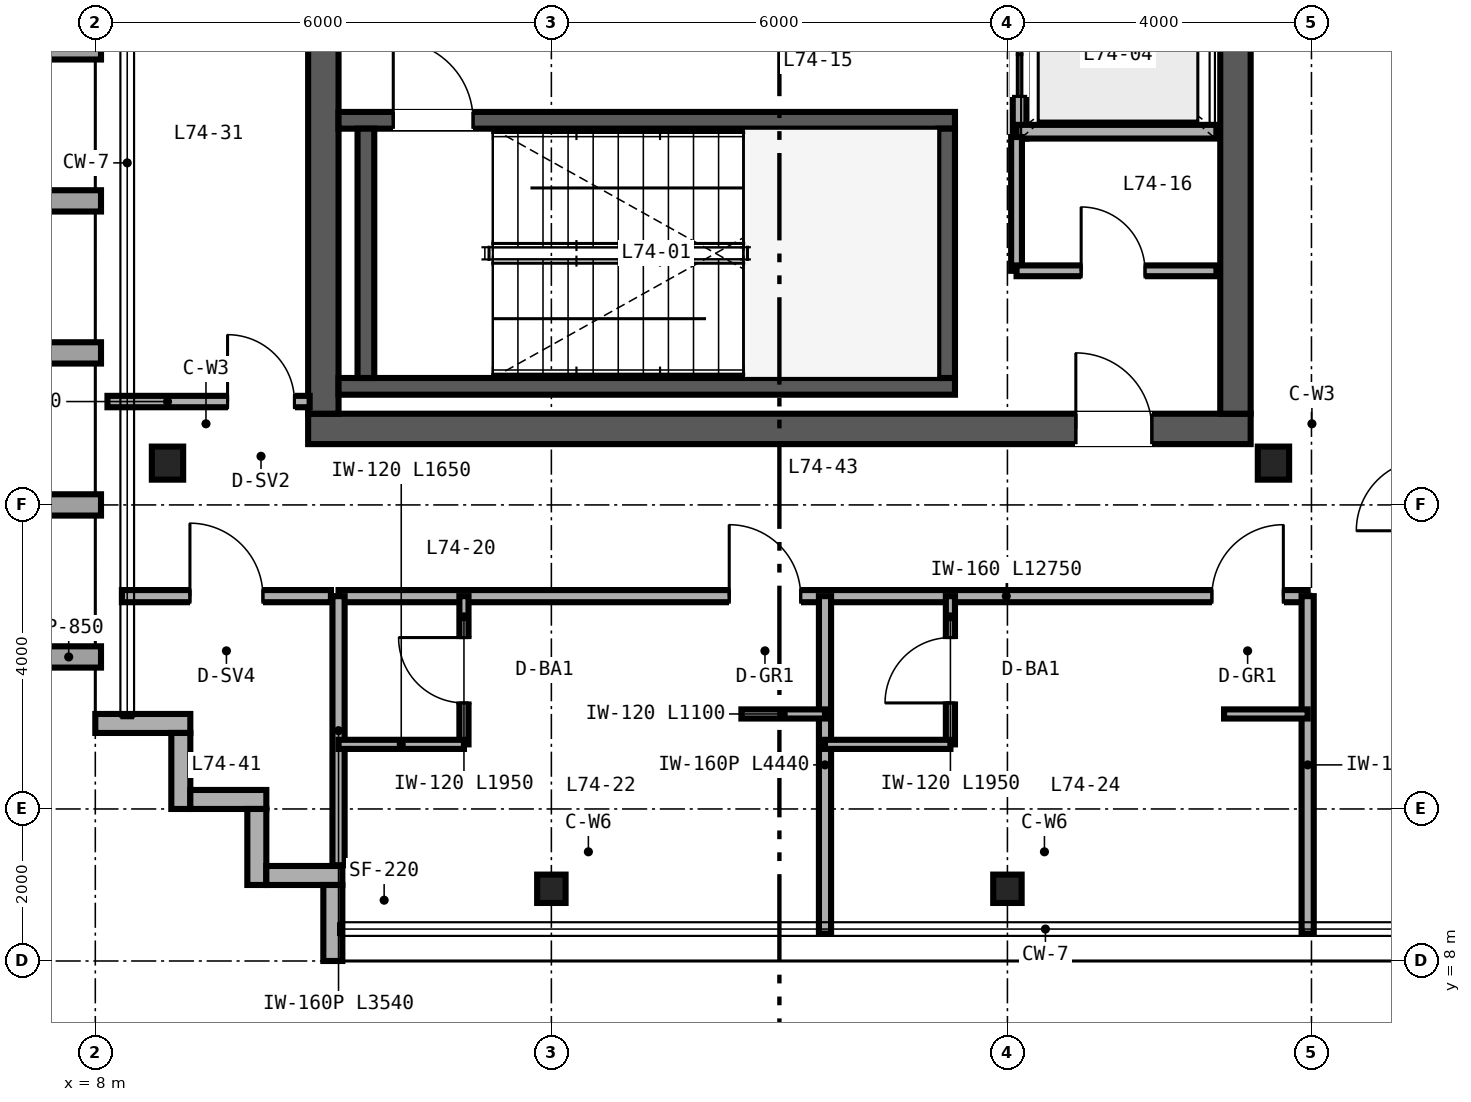
"""IFC4 building model, lengths in metres.
Left out: names, types, materials, properties, quantities, classifications, styles, units other than length and angle.
Written with IfcOpenShell. Run it as: python <this file> out.ifc"""

import sys

from ifc_helpers import new_model, si_unit, direction, frame, frame_2d, origin, origin_2d, place, context, subcontext, project, spatial, rectangle, i_section, extrude, source, transform, mapped, element, fill, save


model = new_model("IFC4")
c1 = context("Model", 3, precision=1e-05, world=origin(), true_north=direction((0.0, 1.0)))
c2 = subcontext(c1, "Body", "Model", "MODEL_VIEW")
j1 = project(units=[si_unit("LENGTHUNIT", "METRE"), si_unit("PLANEANGLEUNIT", "RADIAN")], contexts=[c1])
p1 = place(None, origin())
s1 = spatial("IfcSite", under=j1, at=p1, CompositionType="ELEMENT")
p2 = place(p1, origin())
s2 = spatial("IfcBuilding", under=s1, at=p2, CompositionType="ELEMENT")
p3 = place(p2, frame((0.0, 0.0, 290.4)))
s3 = spatial("IfcBuildingStorey", under=s2, at=p3, CompositionType="ELEMENT", Elevation=290.4)
p4 = place(p3, frame((10.8, 15.0, 0.0), z_axis=(0.0, 0.0, 1.0), x_axis=(1.0, 0.0, 0.0)))
e1 = element("IfcWall", 1, at=p4, inside=s3, PredefinedType="SHEAR", context=c2, shape_type="SweptSolid", body=[
    extrude(rectangle(XDim=12.4, YDim=0.4, at=frame_2d((6.2, 0.0))), origin(), (0.0, 0.0, 1.0), 3.38),
])
p5 = place(p4, frame((10.1, 0.0, 0.0)))
e2 = element("IfcOpeningElement", 2, at=p5, cuts=e1, PredefinedType="OPENING", context=c2, shape_type="SweptSolid", body=[
    extrude(rectangle(XDim=1.0, YDim=2.15, at=frame_2d((0.5, 1.075))), frame((0.0, 0.21, 0.0), z_axis=(0.0, -1.0, 0.0), x_axis=(1.0, 0.0, 0.0)), (0.0, 0.0, 1.0), 0.42),
])
for number, where, z_axis, x_axis in (
    (3, (11.0, 15.2, 0.0), (0.0, 0.0, 1.0), (0.0, 1.0, 0.0)),
    (4, (23.0, 15.2, 0.0), (0.0, 0.0, 1.0), (0.0, 1.0, 0.0)),
):
    element("IfcWall", number, at=place(p3, frame(where, z_axis=z_axis, x_axis=x_axis)), inside=s3, PredefinedType="SHEAR", context=c2, shape_type="SweptSolid", body=[
        extrude(rectangle(XDim=21.6, YDim=0.4, at=frame_2d((10.8, 0.0))), origin(), (0.0, 0.0, 1.0), 3.38),
    ])
p6 = place(p3, frame((11.2, 15.56, 0.0), z_axis=(0.0, 0.0, 1.0), x_axis=(1.0, 0.0, 0.0)))
e5 = element("IfcWall", 5, at=p6, inside=s3, PredefinedType="SHEAR", context=c2, shape_type="SweptSolid", body=[
    extrude(rectangle(XDim=8.11, YDim=0.22, at=frame_2d((4.055, 0.0))), origin(), (0.0, 0.0, 1.0), 3.4),
])
p7 = place(p3, frame((11.2, 19.06, 0.0), z_axis=(0.0, 0.0, 1.0), x_axis=(1.0, 0.0, 0.0)))
e6 = element("IfcWall", 6, at=p7, inside=s3, PredefinedType="SHEAR", context=c2, shape_type="SweptSolid", body=[
    extrude(rectangle(XDim=8.11, YDim=0.22, at=frame_2d((4.055, 0.0))), origin(), (0.0, 0.0, 1.0), 3.4),
])
p8 = place(p7, frame((0.72, 0.0, 0.0)))
e7 = element("IfcOpeningElement", 7, at=p8, cuts=e6, PredefinedType="OPENING", context=c2, shape_type="SweptSolid", body=[
    extrude(rectangle(XDim=1.05, YDim=2.15, at=frame_2d((0.525, 1.075))), frame((0.0, 0.12, 0.0), z_axis=(0.0, -1.0, 0.0), x_axis=(1.0, 0.0, 0.0)), (0.0, 0.0, 1.0), 0.24),
])
for number, where, z_axis, x_axis in (
    (8, (11.56, 15.67, 0.0), (0.0, 0.0, 1.0), (0.0, 1.0, 0.0)),
    (9, (19.2, 15.67, 0.0), (0.0, 0.0, 1.0), (0.0, 1.0, 0.0)),
):
    element("IfcWall", number, at=place(p3, frame(where, z_axis=z_axis, x_axis=x_axis)), inside=s3, PredefinedType="SHEAR", context=c2, shape_type="SweptSolid", body=[
        extrude(rectangle(XDim=3.28, YDim=0.22, at=frame_2d((1.64, 0.0))), origin(), (0.0, 0.0, 1.0), 3.4),
    ])
m1 = source(origin(), c2, "Body", "SweptSolid", [
    extrude(i_section(OverallWidth=0.412, OverallDepth=0.435, WebThickness=0.036, FlangeThickness=0.057, FilletRadius=0.025, at=origin_2d()), origin(), (0.0, 0.0, 1.0), 3.38),
])
for number, where, z_axis, x_axis in (
    (10, (8.95, 14.55, 0.0), (0.0, 0.0, 1.0), (1.0, 0.0, 0.0)),
    (11, (23.5, 14.55, 0.0), (0.0, 0.0, 1.0), (1.0, 0.0, 0.0)),
):
    element("IfcColumn", number, at=place(p3, frame(where, z_axis=z_axis, x_axis=x_axis)), inside=s3, PredefinedType="COLUMN", context=c2, shape_type="MappedRepresentation", body=[
        mapped(m1, transform((0.0, 0.0, 0.0), scale=1.0)),
    ])
m2 = source(origin(), c2, "Body", "SweptSolid", [
    extrude(i_section(OverallWidth=0.374, OverallDepth=0.373, WebThickness=0.016, FlangeThickness=0.026, FilletRadius=0.025, at=origin_2d()), origin(), (0.0, 0.0, 1.0), 3.38),
])
for number, where, z_axis, x_axis in (
    (12, (14.0, 8.95, 0.0), (0.0, 0.0, 1.0), (1.0, 0.0, 0.0)),
    (13, (20.0, 8.95, 0.0), (0.0, 0.0, 1.0), (1.0, 0.0, 0.0)),
):
    element("IfcColumn", number, at=place(p3, frame(where, z_axis=z_axis, x_axis=x_axis)), inside=s3, PredefinedType="COLUMN", context=c2, shape_type="MappedRepresentation", body=[
        mapped(m2, transform((0.0, 0.0, 0.0), scale=1.0)),
    ])
p9 = place(p3, frame((8.0, 11.125, 0.0), z_axis=(0.0, 0.0, 1.0), x_axis=(1.0, 0.0, 0.0)))
e14 = element("IfcWall", 14, at=p9, inside=s3, PredefinedType="SOLIDWALL", context=c2, shape_type="SweptSolid", body=[
    extrude(rectangle(XDim=1.25, YDim=0.25, at=frame_2d((0.625, 0.0))), origin(), (0.0, 0.0, 1.0), 3.38),
])
for number, where, z_axis, x_axis in (
    (15, (9.125, 11.0, 0.0), (0.0, 0.0, 1.0), (0.0, -1.0, 0.0)),
    (16, (9.25, 10.125, 0.0), (0.0, 0.0, 1.0), (1.0, 0.0, 0.0)),
    (17, (10.125, 10.0, 0.0), (0.0, 0.0, 1.0), (0.0, -1.0, 0.0)),
    (18, (10.25, 9.125, 0.0), (0.0, 0.0, 1.0), (1.0, 0.0, 0.0)),
    (19, (11.125, 9.0, 0.0), (0.0, 0.0, 1.0), (0.0, -1.0, 0.0)),
):
    element("IfcWall", number, at=place(p3, frame(where, z_axis=z_axis, x_axis=x_axis)), inside=s3, PredefinedType="SOLIDWALL", context=c2, shape_type="SweptSolid", body=[
        extrude(rectangle(XDim=1.0, YDim=0.25, at=frame_2d((0.5, 0.0))), origin(), (0.0, 0.0, 1.0), 3.38),
    ])
p10 = place(p3, frame((20.16, 18.82, 0.0), z_axis=(0.0, 0.0, 1.0), x_axis=(0.0, 1.0, 0.0)))
e20 = element("IfcWall", 20, at=p10, inside=s3, PredefinedType="SOLIDWALL", context=c2, shape_type="SweptSolid", body=[
    extrude(rectangle(XDim=6.32, YDim=0.18, at=frame_2d((3.16, 0.0))), origin(), (0.0, 0.0, 1.0), 2.48),
])
p11 = place(p10, frame((0.555, 0.0, 0.0)))
e21 = element("IfcOpeningElement", 21, at=p11, cuts=e20, PredefinedType="OPENING", context=c2, shape_type="SweptSolid", body=[
    extrude(rectangle(XDim=1.1, YDim=2.2, at=frame_2d((0.55, 1.1))), frame((0.0, 0.1, 0.0), z_axis=(0.0, -1.0, 0.0), x_axis=(1.0, 0.0, 0.0)), (0.0, 0.0, 1.0), 0.2),
])
p12 = place(p10, frame((2.635, 0.0, 0.0)))
e22 = element("IfcOpeningElement", 22, at=p12, cuts=e20, PredefinedType="OPENING", context=c2, shape_type="SweptSolid", body=[
    extrude(rectangle(XDim=1.1, YDim=2.2, at=frame_2d((0.55, 1.1))), frame((0.0, 0.1, 0.0), z_axis=(0.0, -1.0, 0.0), x_axis=(1.0, 0.0, 0.0)), (0.0, 0.0, 1.0), 0.2),
])
p13 = place(p10, frame((4.69, 0.0, 0.0)))
e23 = element("IfcOpeningElement", 23, at=p13, cuts=e20, PredefinedType="OPENING", context=c2, shape_type="SweptSolid", body=[
    extrude(rectangle(XDim=1.1, YDim=2.2, at=frame_2d((0.55, 1.1))), frame((0.0, 0.1, 0.0), z_axis=(0.0, -1.0, 0.0), x_axis=(1.0, 0.0, 0.0)), (0.0, 0.0, 1.0), 0.2),
])
p14 = place(p3, frame((20.12, 18.91, 0.0), z_axis=(0.0, 0.0, 1.0), x_axis=(1.0, 0.0, 0.0)))
e24 = element("IfcWall", 24, at=p14, inside=s3, PredefinedType="SOLIDWALL", context=c2, shape_type="SweptSolid", body=[
    extrude(rectangle(XDim=2.63, YDim=0.18, at=frame_2d((1.315, 0.0))), origin(), (0.0, 0.0, 1.0), 3.38),
])
p15 = place(p3, frame((20.12, 17.08, 0.0), z_axis=(0.0, 0.0, 1.0), x_axis=(0.0, 1.0, 0.0)))
e25 = element("IfcWall", 25, at=p15, inside=s3, PredefinedType="PARTITIONING", context=c2, shape_type="SweptSolid", body=[
    extrude(rectangle(XDim=1.76, YDim=0.142, at=frame_2d((0.88, 0.0))), origin(), (0.0, 0.0, 1.0), 3.38),
])
p16 = place(p3, frame((20.12, 17.08, 0.0), z_axis=(0.0, 0.0, 1.0), x_axis=(1.0, 0.0, 0.0)))
e26 = element("IfcWall", 26, at=p16, inside=s3, PredefinedType="PARTITIONING", context=c2, shape_type="SweptSolid", body=[
    extrude(rectangle(XDim=2.63, YDim=0.142, at=frame_2d((1.315, 0.0))), origin(), (0.0, 0.0, 1.0), 3.38),
])
p17 = place(p16, frame((0.85, 0.0, 0.0)))
e27 = element("IfcOpeningElement", 27, at=p17, cuts=e26, PredefinedType="OPENING", context=c2, shape_type="SweptSolid", body=[
    extrude(rectangle(XDim=0.84, YDim=2.1, at=frame_2d((0.42, 1.05))), frame((0.0, 0.081, 0.0), z_axis=(0.0, -1.0, 0.0), x_axis=(1.0, 0.0, 0.0)), (0.0, 0.0, 1.0), 0.162),
])
p18 = place(p3, frame((11.2, 12.8, 0.0), z_axis=(0.0, 0.0, 1.0), x_axis=(1.0, 0.0, 0.0)))
e28 = element("IfcWall", 28, at=p18, inside=s3, PredefinedType="PARTITIONING", context=c2, shape_type="SweptSolid", body=[
    extrude(rectangle(XDim=12.75, YDim=0.16, at=frame_2d((6.375, 0.0))), origin(), (0.0, 0.0, 1.0), 3.38),
])
p19 = place(p18, frame((5.14, 0.0, 0.0)))
e29 = element("IfcOpeningElement", 29, at=p19, cuts=e28, PredefinedType="OPENING", context=c2, shape_type="SweptSolid", body=[
    extrude(rectangle(XDim=0.94, YDim=2.15, at=frame_2d((0.47, 1.075))), frame((0.0, 0.09, 0.0), z_axis=(0.0, -1.0, 0.0), x_axis=(1.0, 0.0, 0.0)), (0.0, 0.0, 1.0), 0.18),
])
p20 = place(p18, frame((11.49, 0.0, 0.0)))
e30 = element("IfcOpeningElement", 30, at=p20, cuts=e28, PredefinedType="OPENING", context=c2, shape_type="SweptSolid", body=[
    extrude(rectangle(XDim=0.94, YDim=2.15, at=frame_2d((0.47, 1.075))), frame((0.0, 0.09, 0.0), z_axis=(0.0, -1.0, 0.0), x_axis=(1.0, 0.0, 0.0)), (0.0, 0.0, 1.0), 0.18),
])
p21 = place(p3, frame((11.2, 9.26, 0.0), z_axis=(0.0, 0.0, 1.0), x_axis=(0.0, 1.0, 0.0)))
e31 = element("IfcWall", 31, at=p21, inside=s3, PredefinedType="PARTITIONING", context=c2, shape_type="SweptSolid", body=[
    extrude(rectangle(XDim=3.54, YDim=0.16, at=frame_2d((1.77, 0.0))), origin(), (0.0, 0.0, 1.0), 3.38),
])
p22 = place(p3, frame((23.95, 8.36, 0.0), z_axis=(0.0, 0.0, 1.0), x_axis=(0.0, 1.0, 0.0)))
e32 = element("IfcWall", 32, at=p22, inside=s3, PredefinedType="PARTITIONING", context=c2, shape_type="SweptSolid", body=[
    extrude(rectangle(XDim=4.44, YDim=0.16, at=frame_2d((2.22, 0.0))), origin(), (0.0, 0.0, 1.0), 3.38),
])
p23 = place(p3, frame((17.6, 8.36, 0.0), z_axis=(0.0, 0.0, 1.0), x_axis=(0.0, 1.0, 0.0)))
e33 = element("IfcWall", 33, at=p23, inside=s3, PredefinedType="PARTITIONING", context=c2, shape_type="SweptSolid", body=[
    extrude(rectangle(XDim=4.44, YDim=0.16, at=frame_2d((2.22, 0.0))), origin(), (0.0, 0.0, 1.0), 2.687),
])
p24 = place(p3, frame((12.85, 10.85, 0.0), z_axis=(0.0, 0.0, 1.0), x_axis=(0.0, 1.0, 0.0)))
e34 = element("IfcWall", 34, at=p24, inside=s3, PredefinedType="PARTITIONING", context=c2, shape_type="SweptSolid", body=[
    extrude(rectangle(XDim=1.95, YDim=0.12, at=frame_2d((0.975, 0.0))), origin(), (0.0, 0.0, 1.0), 3.38),
])
p25 = place(p24, frame((0.545, 0.0, 0.0)))
e35 = element("IfcOpeningElement", 35, at=p25, cuts=e34, PredefinedType="OPENING", context=c2, shape_type="SweptSolid", body=[
    extrude(rectangle(XDim=0.86, YDim=2.1, at=frame_2d((0.43, 1.05))), frame((0.0, 0.07, 0.0), z_axis=(0.0, -1.0, 0.0), x_axis=(1.0, 0.0, 0.0)), (0.0, 0.0, 1.0), 0.14),
])
p26 = place(p3, frame((11.2, 10.85, 0.0), z_axis=(0.0, 0.0, 1.0), x_axis=(1.0, 0.0, 0.0)))
e36 = element("IfcWall", 36, at=p26, inside=s3, PredefinedType="PARTITIONING", context=c2, shape_type="SweptSolid", body=[
    extrude(rectangle(XDim=1.65, YDim=0.12, at=frame_2d((0.825, 0.0))), origin(), (0.0, 0.0, 1.0), 3.38),
])
p27 = place(p3, frame((16.5, 11.25, 0.0), z_axis=(0.0, 0.0, 1.0), x_axis=(1.0, 0.0, 0.0)))
e37 = element("IfcWall", 37, at=p27, inside=s3, PredefinedType="PARTITIONING", context=c2, shape_type="SweptSolid", body=[
    extrude(rectangle(XDim=1.1, YDim=0.12, at=frame_2d((0.55, 0.0))), origin(), (0.0, 0.0, 1.0), 3.38),
])
p28 = place(p3, frame((19.25, 10.85, 0.0), z_axis=(0.0, 0.0, 1.0), x_axis=(0.0, 1.0, 0.0)))
e38 = element("IfcWall", 38, at=p28, inside=s3, PredefinedType="PARTITIONING", context=c2, shape_type="SweptSolid", body=[
    extrude(rectangle(XDim=1.95, YDim=0.12, at=frame_2d((0.975, 0.0))), origin(), (0.0, 0.0, 1.0), 3.38),
])
p29 = place(p28, frame((0.545, 0.0, 0.0)))
e39 = element("IfcOpeningElement", 39, at=p29, cuts=e38, PredefinedType="OPENING", context=c2, shape_type="SweptSolid", body=[
    extrude(rectangle(XDim=0.86, YDim=2.1, at=frame_2d((0.43, 1.05))), frame((0.0, 0.07, 0.0), z_axis=(0.0, -1.0, 0.0), x_axis=(1.0, 0.0, 0.0)), (0.0, 0.0, 1.0), 0.14),
])
p30 = place(p3, frame((17.6, 10.85, 0.0), z_axis=(0.0, 0.0, 1.0), x_axis=(1.0, 0.0, 0.0)))
e40 = element("IfcWall", 40, at=p30, inside=s3, PredefinedType="PARTITIONING", context=c2, shape_type="SweptSolid", body=[
    extrude(rectangle(XDim=1.65, YDim=0.12, at=frame_2d((0.825, 0.0))), origin(), (0.0, 0.0, 1.0), 3.38),
])
p31 = place(p3, frame((22.85, 11.25, 0.0), z_axis=(0.0, 0.0, 1.0), x_axis=(1.0, 0.0, 0.0)))
e41 = element("IfcWall", 41, at=p31, inside=s3, PredefinedType="PARTITIONING", context=c2, shape_type="SweptSolid", body=[
    extrude(rectangle(XDim=1.1, YDim=0.12, at=frame_2d((0.55, 0.0))), origin(), (0.0, 0.0, 1.0), 3.38),
])
p32 = place(p3, frame((8.16, 15.36, 0.0), z_axis=(0.0, 0.0, 1.0), x_axis=(1.0, 0.0, 0.0)))
e42 = element("IfcWall", 42, at=p32, inside=s3, PredefinedType="PARTITIONING", context=c2, shape_type="SweptSolid", body=[
    extrude(rectangle(XDim=2.66, YDim=0.15, at=frame_2d((1.33, 0.0))), origin(), (0.0, 0.0, 1.0), 2.601),
])
p33 = place(p32, frame((1.58, 0.0, 0.0)))
e43 = element("IfcOpeningElement", 43, at=p33, cuts=e42, PredefinedType="OPENING", context=c2, shape_type="SweptSolid", body=[
    extrude(rectangle(XDim=0.88, YDim=2.15, at=frame_2d((0.44, 1.075))), frame((0.0, 0.085, 0.0), z_axis=(0.0, -1.0, 0.0), x_axis=(1.0, 0.0, 0.0)), (0.0, 0.0, 1.0), 0.17),
])
p34 = place(p3, frame((8.35, 12.8, 0.0), z_axis=(0.0, 0.0, 1.0), x_axis=(1.0, 0.0, 0.0)))
e44 = element("IfcWall", 44, at=p34, inside=s3, PredefinedType="PARTITIONING", context=c2, shape_type="SweptSolid", body=[
    extrude(rectangle(XDim=2.75, YDim=0.16, at=frame_2d((1.375, 0.0))), origin(), (0.0, 0.0, 1.0), 3.38),
])
p35 = place(p34, frame((0.895, 0.0, 0.0)))
e45 = element("IfcOpeningElement", 45, at=p35, cuts=e44, PredefinedType="OPENING", context=c2, shape_type="SweptSolid", body=[
    extrude(rectangle(XDim=0.96, YDim=2.15, at=frame_2d((0.48, 1.075))), frame((0.0, 0.09, 0.0), z_axis=(0.0, -1.0, 0.0), x_axis=(1.0, 0.0, 0.0)), (0.0, 0.0, 1.0), 0.18),
])
m3 = source(origin(), c2, "Body", "SweptSolid", [
    extrude(rectangle(XDim=1.05, YDim=2.15, at=frame_2d((0.525, 1.075))), frame((0.0, 0.025, 0.0), z_axis=(0.0, -1.0, 0.0), x_axis=(1.0, 0.0, 0.0)), (0.0, 0.0, 1.0), 0.05),
])
p36 = place(p8, origin())
e46 = element("IfcDoor", 46, at=p36, inside=s3, OperationType="SINGLE_SWING_LEFT", PredefinedType="DOOR", context=c2, shape_type="MappedRepresentation", body=[
    mapped(m3, transform((0.0, 0.0, 0.0), scale=1.0)),
])
fill(e7, e46)
m4 = source(origin(), c2, "Body", "SweptSolid", [
    extrude(rectangle(XDim=1.1, YDim=2.2, at=frame_2d((0.55, 1.1))), frame((0.0, 0.025, 0.0), z_axis=(0.0, -1.0, 0.0), x_axis=(1.0, 0.0, 0.0)), (0.0, 0.0, 1.0), 0.05),
])
p37 = place(p11, origin())
e47 = element("IfcDoor", 47, at=p37, inside=s3, OperationType="DOUBLE_DOOR_SLIDING", PredefinedType="DOOR", context=c2, shape_type="MappedRepresentation", body=[
    mapped(m4, transform((0.0, 0.0, 0.0), scale=1.0)),
])
fill(e21, e47)
m5 = source(origin(), c2, "Body", "SweptSolid", [
    extrude(rectangle(XDim=0.84, YDim=2.1, at=frame_2d((0.42, 1.05))), frame((0.0, 0.025, 0.0), z_axis=(0.0, -1.0, 0.0), x_axis=(1.0, 0.0, 0.0)), (0.0, 0.0, 1.0), 0.05),
])
p38 = place(p17, origin())
e48 = element("IfcDoor", 48, at=p38, inside=s3, OperationType="SINGLE_SWING_LEFT", PredefinedType="DOOR", context=c2, shape_type="MappedRepresentation", body=[
    mapped(m5, transform((0.0, 0.0, 0.0), scale=1.0)),
])
fill(e27, e48)
m6 = source(origin(), c2, "Body", "SweptSolid", [
    extrude(rectangle(XDim=1.0, YDim=2.15, at=frame_2d((0.5, 1.075))), frame((0.0, 0.025, 0.0), z_axis=(0.0, -1.0, 0.0), x_axis=(1.0, 0.0, 0.0)), (0.0, 0.0, 1.0), 0.05),
])
p39 = place(p5, origin())
e49 = element("IfcDoor", 49, at=p39, inside=s3, OperationType="SINGLE_SWING_LEFT", PredefinedType="DOOR", context=c2, shape_type="MappedRepresentation", body=[
    mapped(m6, transform((0.0, 0.0, 0.0), scale=1.0)),
])
fill(e2, e49)
m7 = source(origin(), c2, "Body", "SweptSolid", [
    extrude(rectangle(XDim=0.86, YDim=2.1, at=frame_2d((0.43, 1.05))), frame((0.0, 0.025, 0.0), z_axis=(0.0, -1.0, 0.0), x_axis=(1.0, 0.0, 0.0)), (0.0, 0.0, 1.0), 0.05),
])
p40 = place(p25, origin())
e50 = element("IfcDoor", 50, at=p40, inside=s3, OperationType="SINGLE_SWING_RIGHT", PredefinedType="DOOR", context=c2, shape_type="MappedRepresentation", body=[
    mapped(m7, transform((0.0, 0.0, 0.0), scale=1.0)),
])
fill(e35, e50)
p41 = place(p29, origin())
e51 = element("IfcDoor", 51, at=p41, inside=s3, OperationType="SINGLE_SWING_LEFT", PredefinedType="DOOR", context=c2, shape_type="MappedRepresentation", body=[
    mapped(m7, transform((0.0, 0.0, 0.0), scale=1.0)),
])
fill(e39, e51)
m8 = source(origin(), c2, "Body", "SweptSolid", [
    extrude(rectangle(XDim=0.94, YDim=2.15, at=frame_2d((0.47, 1.075))), frame((0.0, 0.025, 0.0), z_axis=(0.0, -1.0, 0.0), x_axis=(1.0, 0.0, 0.0)), (0.0, 0.0, 1.0), 0.05),
])
p42 = place(p19, origin())
e52 = element("IfcDoor", 52, at=p42, inside=s3, OperationType="SINGLE_SWING_LEFT", PredefinedType="DOOR", context=c2, shape_type="MappedRepresentation", body=[
    mapped(m8, transform((0.0, 0.0, 0.0), scale=1.0)),
])
fill(e29, e52)
p43 = place(p20, origin())
e53 = element("IfcDoor", 53, at=p43, inside=s3, OperationType="SINGLE_SWING_RIGHT", PredefinedType="DOOR", context=c2, shape_type="MappedRepresentation", body=[
    mapped(m8, transform((0.0, 0.0, 0.0), scale=1.0)),
])
fill(e30, e53)
m9 = source(origin(), c2, "Body", "SweptSolid", [
    extrude(rectangle(XDim=0.88, YDim=2.15, at=frame_2d((0.44, 1.075))), frame((0.0, 0.025, 0.0), z_axis=(0.0, -1.0, 0.0), x_axis=(1.0, 0.0, 0.0)), (0.0, 0.0, 1.0), 0.05),
])
p44 = place(p33, origin())
e54 = element("IfcDoor", 54, at=p44, inside=s3, OperationType="SINGLE_SWING_LEFT", PredefinedType="DOOR", context=c2, shape_type="MappedRepresentation", body=[
    mapped(m9, transform((0.0, 0.0, 0.0), scale=1.0)),
])
fill(e43, e54)
m10 = source(origin(), c2, "Body", "SweptSolid", [
    extrude(rectangle(XDim=0.96, YDim=2.15, at=frame_2d((0.48, 1.075))), frame((0.0, 0.025, 0.0), z_axis=(0.0, -1.0, 0.0), x_axis=(1.0, 0.0, 0.0)), (0.0, 0.0, 1.0), 0.05),
])
p45 = place(p35, origin())
e55 = element("IfcDoor", 55, at=p45, inside=s3, OperationType="SINGLE_SWING_LEFT", PredefinedType="DOOR", context=c2, shape_type="MappedRepresentation", body=[
    mapped(m10, transform((0.0, 0.0, 0.0), scale=1.0)),
])
fill(e45, e55)
save(model, sys.argv[1])
